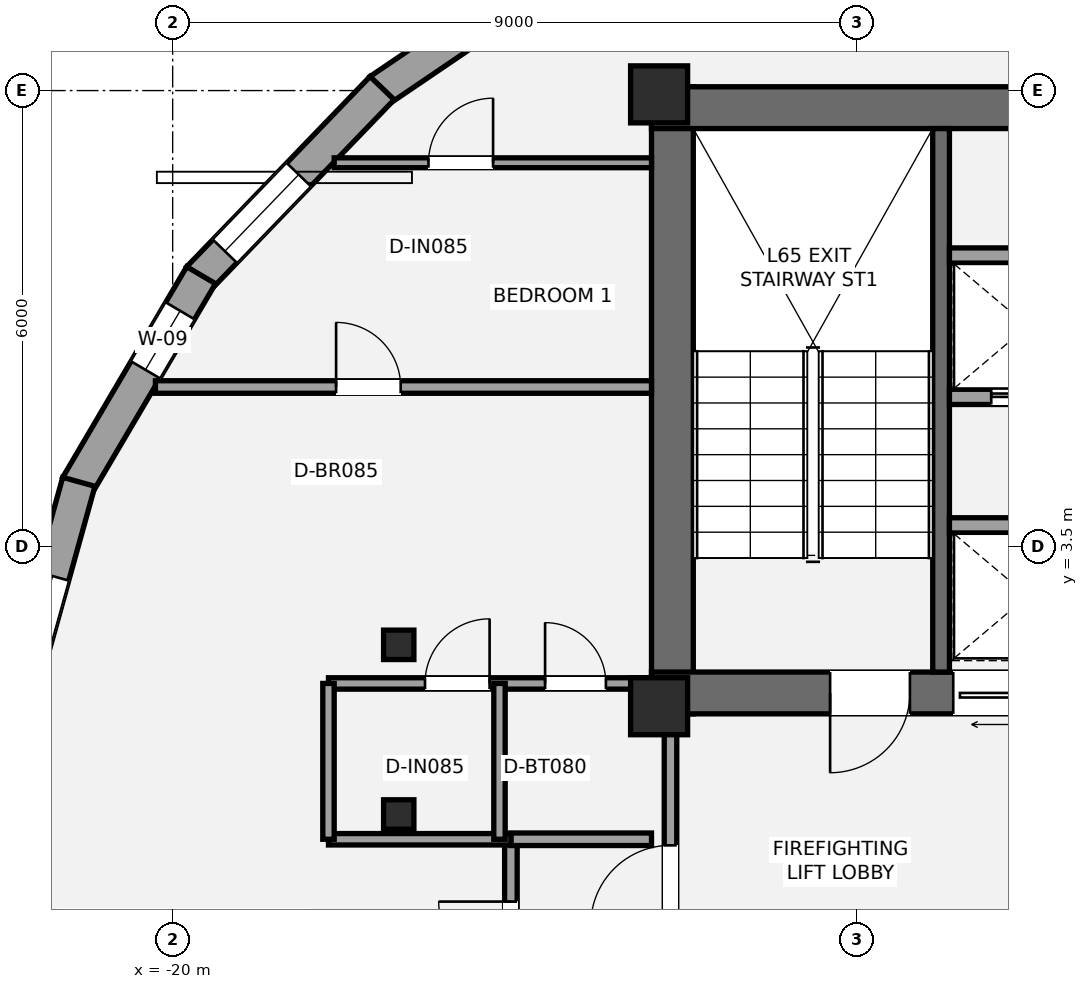
"""IFC4 building model, lengths in metres.
Left out: names, types, materials, properties, quantities, classifications, styles, units other than length and angle.
Written with IfcOpenShell. Run it as: python <this file> out.ifc"""

import sys

from ifc_helpers import new_model, si_unit, direction, frame, frame_2d, origin, origin_2d, place, context, subcontext, project, spatial, rectangle, i_section, extrude, element, fill, save


model = new_model("IFC4")
c1 = context("Model", 3, precision=1e-05, world=origin(), true_north=direction((0.0, 1.0)))
c2 = subcontext(c1, "Body", "Model", "MODEL_VIEW")
j1 = project(units=[si_unit("LENGTHUNIT", "METRE"), si_unit("PLANEANGLEUNIT", "RADIAN")], contexts=[c1])
p1 = place(None, origin())
s1 = spatial("IfcSite", under=j1, at=p1, CompositionType="ELEMENT")
p2 = place(p1, origin())
s2 = spatial("IfcBuilding", under=s1, at=p2, CompositionType="ELEMENT")
p3 = place(p2, frame((0.0, 0.0, 232.05)))
s3 = spatial("IfcBuildingStorey", under=s2, at=p3, CompositionType="ELEMENT", Elevation=232.05)
p4 = place(p3, frame((-13.425, 1.3, 0.0), z_axis=(0.0, 0.0, 1.0), x_axis=(0.0, 1.0, 0.0)))
e1 = element("IfcWall", 1, at=p4, inside=s3, PredefinedType="SHEAR", context=c2, shape_type="SweptSolid", body=[
    extrude(rectangle(XDim=8.25, YDim=0.55, at=frame_2d((4.125, 0.0))), origin(), (0.0, 0.0, 1.0), 3.15),
])
p5 = place(p3, frame((-13.7, 9.275, 0.0), z_axis=(0.0, 0.0, 1.0), x_axis=(1.0, 0.0, 0.0)))
e2 = element("IfcWall", 2, at=p5, inside=s3, PredefinedType="SHEAR", context=c2, shape_type="SweptSolid", body=[
    extrude(rectangle(XDim=9.175, YDim=0.55, at=frame_2d((4.587, 0.0))), origin(), (0.0, 0.0, 1.0), 3.15),
])
p6 = place(p3, frame((-4.925, 1.575, 0.0), z_axis=(0.0, 0.0, 1.0), x_axis=(-1.0, 0.0, 0.0)))
e3 = element("IfcWall", 3, at=p6, inside=s3, PredefinedType="SHEAR", context=c2, shape_type="SweptSolid", body=[
    extrude(rectangle(XDim=8.775, YDim=0.55, at=frame_2d((4.387, 0.0))), origin(), (0.0, 0.0, 1.0), 3.15),
])
p7 = place(p6, frame((5.375, 0.0, 0.0)))
e4 = element("IfcOpeningElement", 4, at=p7, cuts=e3, PredefinedType="OPENING", context=c2, shape_type="SweptSolid", body=[
    extrude(rectangle(XDim=1.05, YDim=2.15, at=frame_2d((0.525, 1.075))), frame((0.0, 0.285, 0.0), z_axis=(0.0, -1.0, 0.0), x_axis=(1.0, 0.0, 0.0)), (0.0, 0.0, 1.0), 0.57),
])
p8 = place(p6, frame((3.705, 0.0, 0.0)))
e5 = element("IfcOpeningElement", 5, at=p8, cuts=e3, PredefinedType="OPENING", context=c2, shape_type="SweptSolid", body=[
    extrude(rectangle(XDim=1.1, YDim=2.2, at=frame_2d((0.55, 1.1))), frame((0.0, 0.285, 0.0), z_axis=(0.0, -1.0, 0.0), x_axis=(1.0, 0.0, 0.0)), (0.0, 0.0, 1.0), 0.57),
])
p9 = place(p3, frame((-9.89, 1.85, 0.0), z_axis=(0.0, 0.0, 1.0), x_axis=(0.0, 1.0, 0.0)))
e6 = element("IfcWall", 6, at=p9, inside=s3, PredefinedType="SHEAR", context=c2, shape_type="SweptSolid", body=[
    extrude(rectangle(XDim=7.15, YDim=0.22, at=frame_2d((3.575, 0.0))), origin(), (0.0, 0.0, 1.0), 3.15),
])
for number, where, z_axis, x_axis in (
    (7, (-13.6, 1.4, 0.0), (0.0, 0.0, 1.0), (1.0, 0.0, 0.0)),
    (8, (-13.6, 9.45, 0.0), (0.0, 0.0, 1.0), (1.0, 0.0, 0.0)),
):
    element("IfcColumn", number, at=place(p3, frame(where, z_axis=z_axis, x_axis=x_axis)), inside=s3, PredefinedType="PILASTER", context=c2, shape_type="SweptSolid", body=[
        extrude(rectangle(XDim=0.75, YDim=0.75, at=origin_2d()), origin(), (0.0, 0.0, 1.0), 3.15),
    ])
for number, where, z_axis, x_axis in (
    (9, (-17.026, 2.208, 0.0), (0.0, 0.0, 1.0), (1.0, 0.0, 0.0)),
    (10, (-17.026, -0.024, 0.0), (0.0, 0.0, 1.0), (1.0, 0.0, 0.0)),
):
    element("IfcColumn", number, at=place(p3, frame(where, z_axis=z_axis, x_axis=x_axis)), inside=s3, PredefinedType="COLUMN", context=c2, shape_type="SweptSolid", body=[
        extrude(i_section(OverallWidth=0.399, OverallDepth=0.387, WebThickness=0.021, FlangeThickness=0.033, at=origin_2d()), origin(), (0.0, 0.0, 1.0), 3.15),
    ])
p10 = place(p3, frame((-17.279, 9.503, 0.0), z_axis=(0.0, 0.0, 1.0), x_axis=(0.827641205742, 0.56125754744, 0.0)))
e11 = element("IfcWall", 11, at=p10, inside=s3, PredefinedType="STANDARD", context=c2, shape_type="SweptSolid", body=[
    extrude(rectangle(XDim=3.771, YDim=0.44, at=frame_2d((1.885, 0.0))), origin(), (0.0, 0.0, 1.0), 2.336),
])
p11 = place(p10, frame((1.477, 0.0, 0.55)))
e12 = element("IfcOpeningElement", 12, at=p11, cuts=e11, PredefinedType="OPENING", context=c2, shape_type="SweptSolid", body=[
    extrude(rectangle(XDim=1.75, YDim=1.55, at=frame_2d((0.875, 0.775))), frame((0.0, 0.23, 0.0), z_axis=(0.0, -1.0, 0.0), x_axis=(1.0, 0.0, 0.0)), (0.0, 0.0, 1.0), 0.46),
])
p12 = place(p3, frame((-19.657, 7.03, 0.0), z_axis=(0.0, 0.0, 1.0), x_axis=(0.694030285144, 0.71994580581, 0.0)))
e13 = element("IfcWall", 13, at=p12, inside=s3, PredefinedType="STANDARD", context=c2, shape_type="SweptSolid", body=[
    extrude(rectangle(XDim=3.476, YDim=0.44, at=frame_2d((1.738, 0.0))), origin(), (0.0, 0.0, 1.0), 2.336),
])
p13 = place(p12, frame((0.496, 0.0, 0.58)))
e14 = element("IfcOpeningElement", 14, at=p13, cuts=e13, PredefinedType="OPENING", context=c2, shape_type="SweptSolid", body=[
    extrude(rectangle(XDim=1.4, YDim=1.55, at=frame_2d((0.7, 0.775))), frame((0.0, 0.23, 0.0), z_axis=(0.0, -1.0, 0.0), x_axis=(1.0, 0.0, 0.0)), (0.0, 0.0, 1.0), 0.46),
])
p14 = place(p3, frame((-21.257, 4.3, 0.0), z_axis=(0.0, 0.0, 1.0), x_axis=(0.507308799926, 0.861764342218, 0.0)))
e15 = element("IfcWall", 15, at=p14, inside=s3, PredefinedType="STANDARD", context=c2, shape_type="SweptSolid", body=[
    extrude(rectangle(XDim=3.215, YDim=0.44, at=frame_2d((1.607, 0.0))), origin(), (0.0, 0.0, 1.0), 2.336),
])
p15 = place(p14, frame((1.771, 0.0, 0.58)))
e16 = element("IfcOpeningElement", 16, at=p15, cuts=e15, PredefinedType="OPENING", context=c2, shape_type="SweptSolid", body=[
    extrude(rectangle(XDim=0.9, YDim=1.35, at=frame_2d((0.45, 0.675))), frame((0.0, 0.23, 0.0), z_axis=(0.0, -1.0, 0.0), x_axis=(1.0, 0.0, 0.0)), (0.0, 0.0, 1.0), 0.46),
])
p16 = place(p3, frame((-22.047, 1.428, 0.0), z_axis=(0.0, 0.0, 1.0), x_axis=(0.267714373586, 0.963498320795, 0.0)))
e17 = element("IfcWall", 17, at=p16, inside=s3, PredefinedType="STANDARD", context=c2, shape_type="SweptSolid", body=[
    extrude(rectangle(XDim=3.036, YDim=0.44, at=frame_2d((1.518, 0.0))), origin(), (0.0, 0.0, 1.0), 2.336),
])
p17 = place(p16, frame((0.348, 0.0, 0.58)))
e18 = element("IfcOpeningElement", 18, at=p17, cuts=e17, PredefinedType="OPENING", context=c2, shape_type="SweptSolid", body=[
    extrude(rectangle(XDim=1.4, YDim=1.55, at=frame_2d((0.7, 0.775))), frame((0.0, 0.23, 0.0), z_axis=(0.0, -1.0, 0.0), x_axis=(1.0, 0.0, 0.0)), (0.0, 0.0, 1.0), 0.46),
])
p18 = place(p3, frame((-13.45, -2.15, 0.0), z_axis=(0.0, 0.0, 1.0), x_axis=(0.0, 1.0, 0.0)))
e19 = element("IfcWall", 19, at=p18, inside=s3, PredefinedType="PARTITIONING", context=c2, shape_type="SweptSolid", body=[
    extrude(rectangle(XDim=3.5, YDim=0.165, at=frame_2d((1.75, 0.0))), origin(), (0.0, 0.0, 1.0), 2.423),
])
p19 = place(p18, frame((0.67, 0.0, 0.0)))
e20 = element("IfcOpeningElement", 20, at=p19, cuts=e19, PredefinedType="OPENING", context=c2, shape_type="SweptSolid", body=[
    extrude(rectangle(XDim=1.05, YDim=2.15, at=frame_2d((0.525, 1.075))), frame((0.0, 0.093, 0.0), z_axis=(0.0, -1.0, 0.0), x_axis=(1.0, 0.0, 0.0)), (0.0, 0.0, 1.0), 0.185),
])
p20 = place(p3, frame((-9.78, 3.78, 0.0), z_axis=(0.0, 0.0, 1.0), x_axis=(1.0, 0.0, 0.0)))
e21 = element("IfcWall", 21, at=p20, inside=s3, PredefinedType="SOLIDWALL", context=c2, shape_type="SweptSolid", body=[
    extrude(rectangle(XDim=4.305, YDim=0.2, at=frame_2d((2.152, 0.0))), origin(), (0.0, 0.0, 1.0), 2.97),
])
p21 = place(p20, frame((2.72, 0.0, 0.0)))
e22 = element("IfcOpeningElement", 22, at=p21, cuts=e21, PredefinedType="OPENING", context=c2, shape_type="SweptSolid", body=[
    extrude(rectangle(XDim=1.1, YDim=2.2, at=frame_2d((0.55, 1.1))), frame((0.0, 0.11, 0.0), z_axis=(0.0, -1.0, 0.0), x_axis=(1.0, 0.0, 0.0)), (0.0, 0.0, 1.0), 0.22),
])
p22 = place(p3, frame((-9.78, 5.47, 0.0), z_axis=(0.0, 0.0, 1.0), x_axis=(1.0, 0.0, 0.0)))
e23 = element("IfcWall", 23, at=p22, inside=s3, PredefinedType="SOLIDWALL", context=c2, shape_type="SweptSolid", body=[
    extrude(rectangle(XDim=4.305, YDim=0.2, at=frame_2d((2.152, 0.0))), origin(), (0.0, 0.0, 1.0), 2.97),
])
p23 = place(p22, frame((0.55, 0.0, 0.0)))
e24 = element("IfcOpeningElement", 24, at=p23, cuts=e23, PredefinedType="OPENING", context=c2, shape_type="SweptSolid", body=[
    extrude(rectangle(XDim=1.1, YDim=2.2, at=frame_2d((0.55, 1.1))), frame((0.0, 0.11, 0.0), z_axis=(0.0, -1.0, 0.0), x_axis=(1.0, 0.0, 0.0)), (0.0, 0.0, 1.0), 0.22),
])
p24 = place(p22, frame((2.72, 0.0, 0.0)))
e25 = element("IfcOpeningElement", 25, at=p24, cuts=e23, PredefinedType="OPENING", context=c2, shape_type="SweptSolid", body=[
    extrude(rectangle(XDim=1.1, YDim=2.2, at=frame_2d((0.55, 1.1))), frame((0.0, 0.11, 0.0), z_axis=(0.0, -1.0, 0.0), x_axis=(1.0, 0.0, 0.0)), (0.0, 0.0, 1.0), 0.22),
])
p25 = place(p3, frame((-9.78, 7.33, 0.0), z_axis=(0.0, 0.0, 1.0), x_axis=(1.0, 0.0, 0.0)))
e26 = element("IfcWall", 26, at=p25, inside=s3, PredefinedType="SOLIDWALL", context=c2, shape_type="SweptSolid", body=[
    extrude(rectangle(XDim=4.305, YDim=0.2, at=frame_2d((2.152, 0.0))), origin(), (0.0, 0.0, 1.0), 2.97),
])
p26 = place(p3, frame((-15.55, -3.95, 0.0), z_axis=(0.0, 0.0, 1.0), x_axis=(0.0, 1.0, 0.0)))
e27 = element("IfcWall", 27, at=p26, inside=s3, PredefinedType="PARTITIONING", context=c2, shape_type="SweptSolid", body=[
    extrude(rectangle(XDim=3.6, YDim=0.165, at=frame_2d((1.8, 0.0))), origin(), (0.0, 0.0, 1.0), 2.357),
])
p27 = place(p26, frame((1.83, 0.0, 0.0)))
e28 = element("IfcOpeningElement", 28, at=p27, cuts=e27, PredefinedType="OPENING", context=c2, shape_type="SweptSolid", body=[
    extrude(rectangle(XDim=0.95, YDim=2.15, at=frame_2d((0.475, 1.075))), frame((0.0, 0.093, 0.0), z_axis=(0.0, -1.0, 0.0), x_axis=(1.0, 0.0, 0.0)), (0.0, 0.0, 1.0), 0.185),
])
p28 = place(p3, frame((-15.55, -0.35, 0.0), z_axis=(0.0, 0.0, 1.0), x_axis=(1.0, 0.0, 0.0)))
e29 = element("IfcWall", 29, at=p28, inside=s3, PredefinedType="PARTITIONING", context=c2, shape_type="SweptSolid", body=[
    extrude(rectangle(XDim=1.85, YDim=0.165, at=frame_2d((0.925, 0.0))), origin(), (0.0, 0.0, 1.0), 2.97),
])
p29 = place(p3, frame((-20.227, 5.6, 0.0), z_axis=(0.0, 0.0, 1.0), x_axis=(1.0, 0.0, 0.0)))
e30 = element("IfcWall", 30, at=p29, inside=s3, PredefinedType="PARTITIONING", context=c2, shape_type="SweptSolid", body=[
    extrude(rectangle(XDim=6.527, YDim=0.165, at=frame_2d((3.264, 0.0))), origin(), (0.0, 0.0, 1.0), 2.423),
])
p30 = place(p29, frame((2.377, 0.0, 0.0)))
e31 = element("IfcOpeningElement", 31, at=p30, cuts=e30, PredefinedType="OPENING", context=c2, shape_type="SweptSolid", body=[
    extrude(rectangle(XDim=0.85, YDim=2.1, at=frame_2d((0.425, 1.05))), frame((0.0, 0.093, 0.0), z_axis=(0.0, -1.0, 0.0), x_axis=(1.0, 0.0, 0.0)), (0.0, 0.0, 1.0), 0.185),
])
p31 = place(p3, frame((-17.95, 1.7, 0.0), z_axis=(0.0, 0.0, 1.0), x_axis=(1.0, 0.0, 0.0)))
e32 = element("IfcWall", 32, at=p31, inside=s3, PredefinedType="PLUMBINGWALL", context=c2, shape_type="SweptSolid", body=[
    extrude(rectangle(XDim=4.25, YDim=0.15, at=frame_2d((2.125, 0.0))), origin(), (0.0, 0.0, 1.0), 2.423),
])
p32 = place(p31, frame((2.85, 0.0, 0.0)))
e33 = element("IfcOpeningElement", 33, at=p32, cuts=e32, PredefinedType="OPENING", context=c2, shape_type="SweptSolid", body=[
    extrude(rectangle(XDim=0.8, YDim=2.1, at=frame_2d((0.4, 1.05))), frame((0.0, 0.085, 0.0), z_axis=(0.0, -1.0, 0.0), x_axis=(1.0, 0.0, 0.0)), (0.0, 0.0, 1.0), 0.17),
])
p33 = place(p31, frame((1.27, 0.0, 0.0)))
e34 = element("IfcOpeningElement", 34, at=p33, cuts=e32, PredefinedType="OPENING", context=c2, shape_type="SweptSolid", body=[
    extrude(rectangle(XDim=0.85, YDim=2.1, at=frame_2d((0.425, 1.05))), frame((0.0, 0.085, 0.0), z_axis=(0.0, -1.0, 0.0), x_axis=(1.0, 0.0, 0.0)), (0.0, 0.0, 1.0), 0.17),
])
p34 = place(p3, frame((-17.95, -0.35, 0.0), z_axis=(0.0, 0.0, 1.0), x_axis=(1.0, 0.0, 0.0)))
e35 = element("IfcWall", 35, at=p34, inside=s3, PredefinedType="PLUMBINGWALL", context=c2, shape_type="SweptSolid", body=[
    extrude(rectangle(XDim=2.4, YDim=0.15, at=frame_2d((1.2, 0.0))), origin(), (0.0, 0.0, 1.0), 2.423),
])
for number, where, z_axis, x_axis in (
    (36, (-15.7, -0.35, 0.0), (0.0, 0.0, 1.0), (0.0, 1.0, 0.0)),
    (37, (-17.95, -0.35, 0.0), (0.0, 0.0, 1.0), (0.0, 1.0, 0.0)),
):
    element("IfcWall", number, at=place(p3, frame(where, z_axis=z_axis, x_axis=x_axis)), inside=s3, PredefinedType="PLUMBINGWALL", context=c2, shape_type="SweptSolid", body=[
        extrude(rectangle(XDim=2.05, YDim=0.15, at=frame_2d((1.025, 0.0))), origin(), (0.0, 0.0, 1.0), 2.423),
    ])
p35 = place(p3, frame((-17.875, 8.55, 0.0), z_axis=(0.0, 0.0, 1.0), x_axis=(1.0, 0.0, 0.0)))
e38 = element("IfcWall", 38, at=p35, inside=s3, PredefinedType="PARTITIONING", context=c2, shape_type="SweptSolid", body=[
    extrude(rectangle(XDim=4.175, YDim=0.13, at=frame_2d((2.087, 0.0))), origin(), (0.0, 0.0, 1.0), 2.423),
])
p36 = place(p35, frame((1.24, 0.0, 0.0)))
e39 = element("IfcOpeningElement", 39, at=p36, cuts=e38, PredefinedType="OPENING", context=c2, shape_type="SweptSolid", body=[
    extrude(rectangle(XDim=0.85, YDim=2.1, at=frame_2d((0.425, 1.05))), frame((0.0, 0.075, 0.0), z_axis=(0.0, -1.0, 0.0), x_axis=(1.0, 0.0, 0.0)), (0.0, 0.0, 1.0), 0.15),
])
p37 = place(p13, origin())
e40 = element("IfcWindow", 40, at=p37, inside=s3, PartitioningType="SINGLE_PANEL", PredefinedType="WINDOW", context=c2, shape_type="SweptSolid", body=[
    extrude(rectangle(XDim=1.4, YDim=1.55, at=frame_2d((0.7, 0.775))), frame((0.0, -0.01, 0.0), z_axis=(0.0, -1.0, 0.0), x_axis=(1.0, 0.0, 0.0)), (0.0, 0.0, 1.0), 0.06),
])
fill(e14, e40)
p38 = place(p15, origin())
e41 = element("IfcWindow", 41, at=p38, inside=s3, PartitioningType="SINGLE_PANEL", PredefinedType="WINDOW", context=c2, shape_type="SweptSolid", body=[
    extrude(rectangle(XDim=0.9, YDim=1.35, at=frame_2d((0.45, 0.675))), frame((0.0, -0.01, 0.0), z_axis=(0.0, -1.0, 0.0), x_axis=(1.0, 0.0, 0.0)), (0.0, 0.0, 1.0), 0.06),
])
fill(e16, e41)
p39 = place(p17, origin())
e42 = element("IfcWindow", 42, at=p39, inside=s3, PartitioningType="SINGLE_PANEL", PredefinedType="WINDOW", context=c2, shape_type="SweptSolid", body=[
    extrude(rectangle(XDim=1.4, YDim=1.55, at=frame_2d((0.7, 0.775))), frame((0.0, -0.01, 0.0), z_axis=(0.0, -1.0, 0.0), x_axis=(1.0, 0.0, 0.0)), (0.0, 0.0, 1.0), 0.06),
])
fill(e18, e42)
p40 = place(p7, origin())
e43 = element("IfcDoor", 43, at=p40, inside=s3, OperationType="SINGLE_SWING_RIGHT", PredefinedType="DOOR", context=c2, shape_type="SweptSolid", body=[
    extrude(rectangle(XDim=1.05, YDim=2.15, at=frame_2d((0.525, 1.075))), frame((0.0, 0.025, 0.0), z_axis=(0.0, -1.0, 0.0), x_axis=(1.0, 0.0, 0.0)), (0.0, 0.0, 1.0), 0.05),
])
fill(e4, e43)
p41 = place(p19, origin())
e44 = element("IfcDoor", 44, at=p41, inside=s3, OperationType="SINGLE_SWING_LEFT", PredefinedType="DOOR", context=c2, shape_type="SweptSolid", body=[
    extrude(rectangle(XDim=1.05, YDim=2.15, at=frame_2d((0.525, 1.075))), frame((0.0, 0.025, 0.0), z_axis=(0.0, -1.0, 0.0), x_axis=(1.0, 0.0, 0.0)), (0.0, 0.0, 1.0), 0.05),
])
fill(e20, e44)
p42 = place(p8, origin())
e45 = element("IfcDoor", 45, at=p42, inside=s3, OperationType="SLIDING_TO_LEFT", PredefinedType="DOOR", context=c2, shape_type="SweptSolid", body=[
    extrude(rectangle(XDim=1.1, YDim=2.2, at=frame_2d((0.55, 1.1))), frame((0.0, 0.025, 0.0), z_axis=(0.0, -1.0, 0.0), x_axis=(1.0, 0.0, 0.0)), (0.0, 0.0, 1.0), 0.05),
])
fill(e5, e45)
p43 = place(p23, origin())
e46 = element("IfcDoor", 46, at=p43, inside=s3, OperationType="SLIDING_TO_LEFT", PredefinedType="DOOR", context=c2, shape_type="SweptSolid", body=[
    extrude(rectangle(XDim=1.1, YDim=2.2, at=frame_2d((0.55, 1.1))), frame((0.0, 0.025, 0.0), z_axis=(0.0, -1.0, 0.0), x_axis=(1.0, 0.0, 0.0)), (0.0, 0.0, 1.0), 0.05),
])
fill(e24, e46)
p44 = place(p27, origin())
e47 = element("IfcDoor", 47, at=p44, inside=s3, OperationType="SINGLE_SWING_RIGHT", PredefinedType="DOOR", context=c2, shape_type="SweptSolid", body=[
    extrude(rectangle(XDim=0.95, YDim=2.15, at=frame_2d((0.475, 1.075))), frame((0.0, 0.025, 0.0), z_axis=(0.0, -1.0, 0.0), x_axis=(1.0, 0.0, 0.0)), (0.0, 0.0, 1.0), 0.05),
])
fill(e28, e47)
p45 = place(p32, origin())
e48 = element("IfcDoor", 48, at=p45, inside=s3, OperationType="SINGLE_SWING_LEFT", PredefinedType="DOOR", context=c2, shape_type="SweptSolid", body=[
    extrude(rectangle(XDim=0.8, YDim=2.1, at=frame_2d((0.4, 1.05))), frame((0.0, 0.025, 0.0), z_axis=(0.0, -1.0, 0.0), x_axis=(1.0, 0.0, 0.0)), (0.0, 0.0, 1.0), 0.05),
])
fill(e33, e48)
p46 = place(p33, origin())
e49 = element("IfcDoor", 49, at=p46, inside=s3, OperationType="SINGLE_SWING_RIGHT", PredefinedType="DOOR", context=c2, shape_type="SweptSolid", body=[
    extrude(rectangle(XDim=0.85, YDim=2.1, at=frame_2d((0.425, 1.05))), frame((0.0, 0.025, 0.0), z_axis=(0.0, -1.0, 0.0), x_axis=(1.0, 0.0, 0.0)), (0.0, 0.0, 1.0), 0.05),
])
fill(e34, e49)
p47 = place(p30, origin())
e50 = element("IfcDoor", 50, at=p47, inside=s3, OperationType="SINGLE_SWING_LEFT", PredefinedType="DOOR", context=c2, shape_type="SweptSolid", body=[
    extrude(rectangle(XDim=0.85, YDim=2.1, at=frame_2d((0.425, 1.05))), frame((0.0, 0.025, 0.0), z_axis=(0.0, -1.0, 0.0), x_axis=(1.0, 0.0, 0.0)), (0.0, 0.0, 1.0), 0.05),
])
fill(e31, e50)
p48 = place(p36, origin())
e51 = element("IfcDoor", 51, at=p48, inside=s3, OperationType="SINGLE_SWING_RIGHT", PredefinedType="DOOR", context=c2, shape_type="SweptSolid", body=[
    extrude(rectangle(XDim=0.85, YDim=2.1, at=frame_2d((0.425, 1.05))), frame((0.0, 0.025, 0.0), z_axis=(0.0, -1.0, 0.0), x_axis=(1.0, 0.0, 0.0)), (0.0, 0.0, 1.0), 0.05),
])
fill(e39, e51)
save(model, sys.argv[1])
